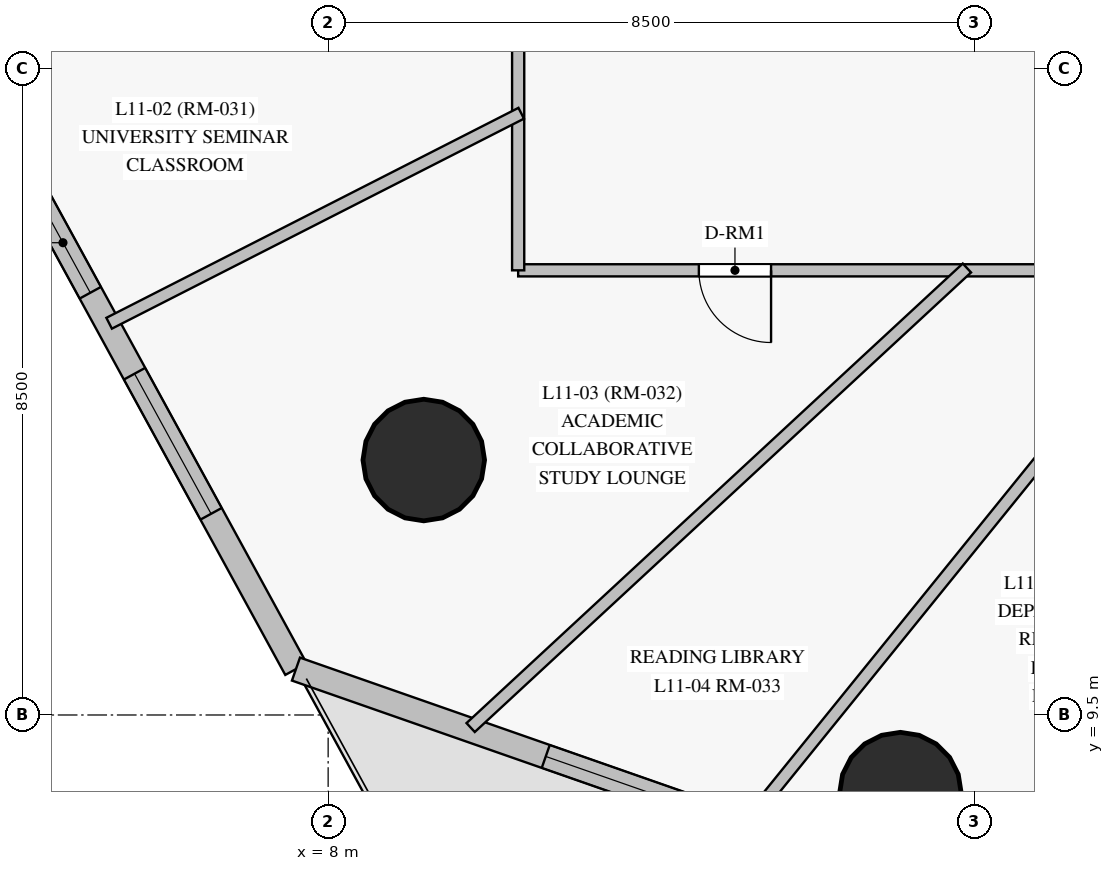
"""IFC4 building model, lengths in metres.
Left out: names, types, materials, properties, quantities, classifications, styles, units other than length and angle.
Written with IfcOpenShell. Run it as: python <this file> out.ifc"""

import sys

from ifc_helpers import new_model, si_unit, direction, frame, frame_2d, origin, origin_with_axes, origin_2d, place, context, subcontext, project, spatial, rectangle, circle, extrude, source, transform, mapped, element, fill, save


model = new_model("IFC4")
c1 = context("Model", 3, precision=1e-05, world=origin(), true_north=direction((0.0, 1.0)))
c2 = subcontext(c1, "Body", "Model", "MODEL_VIEW")
j1 = project(units=[si_unit("LENGTHUNIT", "METRE"), si_unit("PLANEANGLEUNIT", "RADIAN")], contexts=[c1])
p1 = place(None, origin())
s1 = spatial("IfcSite", under=j1, at=p1, CompositionType="ELEMENT")
p2 = place(p1, origin())
s2 = spatial("IfcBuilding", under=s1, at=p2, CompositionType="ELEMENT")
p3 = place(p2, frame((0.0, 0.0, 44.5)))
s3 = spatial("IfcBuildingStorey", under=s2, at=p3, CompositionType="ELEMENT", Elevation=44.5)
m1 = source(origin_with_axes(), c2, "Body", "SweptSolid", [
    extrude(circle(Radius=0.8, at=origin_2d()), origin(), (0.0, 0.0, 1.0), 3.6),
])
for number, where, z_axis, x_axis in (
    (1, (9.258, 12.854, 0.0), (0.0, 0.0, 1.0), (1.0, 0.0, 0.0)),
    (2, (15.529, 8.472, 0.0), (0.0, 0.0, 1.0), (1.0, 0.0, 0.0)),
):
    element("IfcColumn", number, at=place(p3, frame(where, z_axis=z_axis, x_axis=x_axis)), inside=s3, PredefinedType="COLUMN", context=c2, shape_type="MappedRepresentation", body=[
        mapped(m1, transform((0.0, 0.0, 0.0), scale=1.0)),
    ])
p4 = place(p3, frame((3.897, 16.838, 0.0), z_axis=(0.0, 0.0, 1.0), x_axis=(0.479531833204, -0.877524484527, 0.0)))
e3 = element("IfcWall", 3, at=p4, inside=s3, PredefinedType="SOLIDWALL", context=c2, shape_type="SweptSolid", body=[
    extrude(rectangle(XDim=7.674, YDim=0.32, at=frame_2d((3.837, 0.0))), origin(), (0.0, 0.0, 1.0), 3.35),
])
p5 = place(p4, frame((0.532, 0.0, 0.85)))
e4 = element("IfcOpeningElement", 4, at=p5, cuts=e3, PredefinedType="OPENING", context=c2, shape_type="SweptSolid", body=[
    extrude(rectangle(XDim=1.5, YDim=1.85, at=frame_2d((0.75, 0.925))), frame((0.0, 0.17, 0.0), z_axis=(0.0, -1.0, 0.0), x_axis=(1.0, 0.0, 0.0)), (0.0, 0.0, 1.0), 0.34),
])
p6 = place(p4, frame((3.246, 0.0, 0.85)))
e5 = element("IfcOpeningElement", 5, at=p6, cuts=e3, PredefinedType="OPENING", context=c2, shape_type="SweptSolid", body=[
    extrude(rectangle(XDim=2.1, YDim=1.95, at=frame_2d((1.05, 0.975))), frame((0.0, 0.17, 0.0), z_axis=(0.0, -1.0, 0.0), x_axis=(1.0, 0.0, 0.0)), (0.0, 0.0, 1.0), 0.34),
])
p7 = place(p3, frame((7.577, 10.104, 0.0), z_axis=(0.0, 0.0, 1.0), x_axis=(0.943969817427, -0.330031792086, 0.0)))
e6 = element("IfcWall", 6, at=p7, inside=s3, PredefinedType="SOLIDWALL", context=c2, shape_type="SweptSolid", body=[
    extrude(rectangle(XDim=18.568, YDim=0.32, at=frame_2d((9.284, 0.0))), origin(), (0.0, 0.0, 1.0), 3.02),
])
p8 = place(p7, frame((3.481, 0.0, 0.85)))
e7 = element("IfcOpeningElement", 7, at=p8, cuts=e6, PredefinedType="OPENING", context=c2, shape_type="SweptSolid", body=[
    extrude(rectangle(XDim=2.1, YDim=1.95, at=frame_2d((1.05, 0.975))), frame((0.0, 0.17, 0.0), z_axis=(0.0, -1.0, 0.0), x_axis=(1.0, 0.0, 0.0)), (0.0, 0.0, 1.0), 0.34),
])
p9 = place(p7, frame((11.232, 0.0, 0.85)))
e8 = element("IfcOpeningElement", 8, at=p9, cuts=e6, PredefinedType="OPENING", context=c2, shape_type="SweptSolid", body=[
    extrude(rectangle(XDim=2.1, YDim=1.95, at=frame_2d((1.05, 0.975))), frame((0.0, 0.17, 0.0), z_axis=(0.0, -1.0, 0.0), x_axis=(1.0, 0.0, 0.0)), (0.0, 0.0, 1.0), 0.34),
])
p10 = place(p7, frame((14.948, 0.0, 0.0)))
e9 = element("IfcOpeningElement", 9, at=p10, cuts=e6, PredefinedType="OPENING", context=c2, shape_type="SweptSolid", body=[
    extrude(rectangle(XDim=1.05, YDim=2.12, at=frame_2d((0.525, 1.06))), frame((0.0, 0.17, 0.0), z_axis=(0.0, -1.0, 0.0), x_axis=(1.0, 0.0, 0.0)), (0.0, 0.0, 1.0), 0.34),
])
p11 = place(p3, frame((40.25, 15.35, 0.0), z_axis=(0.0, 0.0, 1.0), x_axis=(-1.0, 0.0, 0.0)))
e10 = element("IfcWall", 10, at=p11, inside=s3, PredefinedType="PARTITIONING", context=c2, shape_type="SweptSolid", body=[
    extrude(rectangle(XDim=29.75, YDim=0.16, at=frame_2d((14.875, 0.0))), origin(), (0.0, 0.0, 1.0), 2.7),
])
p12 = place(p11, frame((26.423, 0.0, 0.0)))
e11 = element("IfcOpeningElement", 11, at=p12, cuts=e10, PredefinedType="OPENING", context=c2, shape_type="SweptSolid", body=[
    extrude(rectangle(XDim=0.95, YDim=2.15, at=frame_2d((0.475, 1.075))), frame((0.0, 0.09, 0.0), z_axis=(0.0, -1.0, 0.0), x_axis=(1.0, 0.0, 0.0)), (0.0, 0.0, 1.0), 0.18),
])
p13 = place(p11, frame((21.837, 0.0, 0.0)))
e12 = element("IfcOpeningElement", 12, at=p13, cuts=e10, PredefinedType="OPENING", context=c2, shape_type="SweptSolid", body=[
    extrude(rectangle(XDim=0.95, YDim=2.15, at=frame_2d((0.475, 1.075))), frame((0.0, 0.09, 0.0), z_axis=(0.0, -1.0, 0.0), x_axis=(1.0, 0.0, 0.0)), (0.0, 0.0, 1.0), 0.18),
])
p14 = place(p11, frame((18.863, 0.0, 0.0)))
e13 = element("IfcOpeningElement", 13, at=p14, cuts=e10, PredefinedType="OPENING", context=c2, shape_type="SweptSolid", body=[
    extrude(rectangle(XDim=0.95, YDim=2.15, at=frame_2d((0.475, 1.075))), frame((0.0, 0.09, 0.0), z_axis=(0.0, -1.0, 0.0), x_axis=(1.0, 0.0, 0.0)), (0.0, 0.0, 1.0), 0.18),
])
p15 = place(p11, frame((16.388, 0.0, 0.0)))
e14 = element("IfcOpeningElement", 14, at=p15, cuts=e10, PredefinedType="OPENING", context=c2, shape_type="SweptSolid", body=[
    extrude(rectangle(XDim=0.95, YDim=2.15, at=frame_2d((0.475, 1.075))), frame((0.0, 0.09, 0.0), z_axis=(0.0, -1.0, 0.0), x_axis=(1.0, 0.0, 0.0)), (0.0, 0.0, 1.0), 0.18),
])
p16 = place(p11, frame((14.4, 0.0, 0.0)))
e15 = element("IfcOpeningElement", 15, at=p16, cuts=e10, PredefinedType="OPENING", context=c2, shape_type="SweptSolid", body=[
    extrude(rectangle(XDim=0.95, YDim=2.15, at=frame_2d((0.475, 1.075))), frame((0.0, 0.09, 0.0), z_axis=(0.0, -1.0, 0.0), x_axis=(1.0, 0.0, 0.0)), (0.0, 0.0, 1.0), 0.18),
])
p17 = place(p11, frame((12.118, 0.0, 0.0)))
e16 = element("IfcOpeningElement", 16, at=p17, cuts=e10, PredefinedType="OPENING", context=c2, shape_type="SweptSolid", body=[
    extrude(rectangle(XDim=0.95, YDim=2.15, at=frame_2d((0.475, 1.075))), frame((0.0, 0.09, 0.0), z_axis=(0.0, -1.0, 0.0), x_axis=(1.0, 0.0, 0.0)), (0.0, 0.0, 1.0), 0.18),
])
p18 = place(p11, frame((9.938, 0.0, 0.0)))
e17 = element("IfcOpeningElement", 17, at=p18, cuts=e10, PredefinedType="OPENING", context=c2, shape_type="SweptSolid", body=[
    extrude(rectangle(XDim=0.95, YDim=2.15, at=frame_2d((0.475, 1.075))), frame((0.0, 0.09, 0.0), z_axis=(0.0, -1.0, 0.0), x_axis=(1.0, 0.0, 0.0)), (0.0, 0.0, 1.0), 0.18),
])
p19 = place(p11, frame((6.962, 0.0, 0.0)))
e18 = element("IfcOpeningElement", 18, at=p19, cuts=e10, PredefinedType="OPENING", context=c2, shape_type="SweptSolid", body=[
    extrude(rectangle(XDim=0.95, YDim=2.15, at=frame_2d((0.475, 1.075))), frame((0.0, 0.09, 0.0), z_axis=(0.0, -1.0, 0.0), x_axis=(1.0, 0.0, 0.0)), (0.0, 0.0, 1.0), 0.18),
])
p20 = place(p3, frame((10.5, 15.35, 0.0), z_axis=(0.0, 0.0, 1.0), x_axis=(0.0, 1.0, 0.0)))
e19 = element("IfcWall", 19, at=p20, inside=s3, PredefinedType="PARTITIONING", context=c2, shape_type="SweptSolid", body=[
    extrude(rectangle(XDim=22.3, YDim=0.16, at=frame_2d((11.15, 0.0))), origin(), (0.0, 0.0, 1.0), 2.75),
])
p21 = place(p20, frame((10.035, 0.0, 0.0)))
e20 = element("IfcOpeningElement", 20, at=p21, cuts=e19, PredefinedType="OPENING", context=c2, shape_type="SweptSolid", body=[
    extrude(rectangle(XDim=0.95, YDim=2.15, at=frame_2d((0.475, 1.075))), frame((0.0, 0.09, 0.0), z_axis=(0.0, -1.0, 0.0), x_axis=(1.0, 0.0, 0.0)), (0.0, 0.0, 1.0), 0.18),
])
p22 = place(p20, frame((3.031, 0.0, 0.0)))
e21 = element("IfcOpeningElement", 21, at=p22, cuts=e19, PredefinedType="OPENING", context=c2, shape_type="SweptSolid", body=[
    extrude(rectangle(XDim=0.96, YDim=2.15, at=frame_2d((0.48, 1.075))), frame((0.0, 0.09, 0.0), z_axis=(0.0, -1.0, 0.0), x_axis=(1.0, 0.0, 0.0)), (0.0, 0.0, 1.0), 0.18),
])
p23 = place(p20, frame((16.25, 0.0, 0.0)))
e22 = element("IfcOpeningElement", 22, at=p23, cuts=e19, PredefinedType="OPENING", context=c2, shape_type="SweptSolid", body=[
    extrude(rectangle(XDim=0.95, YDim=2.15, at=frame_2d((0.475, 1.075))), frame((0.0, 0.09, 0.0), z_axis=(0.0, -1.0, 0.0), x_axis=(1.0, 0.0, 0.0)), (0.0, 0.0, 1.0), 0.18),
])
p24 = place(p20, frame((12.443, 0.0, 0.0)))
e23 = element("IfcOpeningElement", 23, at=p24, cuts=e19, PredefinedType="OPENING", context=c2, shape_type="SweptSolid", body=[
    extrude(rectangle(XDim=0.95, YDim=2.15, at=frame_2d((0.475, 1.075))), frame((0.0, 0.09, 0.0), z_axis=(0.0, -1.0, 0.0), x_axis=(1.0, 0.0, 0.0)), (0.0, 0.0, 1.0), 0.18),
])
p25 = place(p3, frame((19.423, 15.385, 0.0), z_axis=(0.0, 0.0, 1.0), x_axis=(-0.629280245268, -0.777178469153, 0.0)))
e24 = element("IfcWall", 24, at=p25, inside=s3, PredefinedType="PARTITIONING", context=c2, shape_type="SweptSolid", body=[
    extrude(rectangle(XDim=9.419, YDim=0.16, at=frame_2d((4.709, 0.0))), origin(), (0.0, 0.0, 1.0), 2.7),
])
p26 = place(p3, frame((16.404, 15.381, 0.0), z_axis=(0.0, 0.0, 1.0), x_axis=(-0.733733824599, -0.679437027722, 0.0)))
e25 = element("IfcWall", 25, at=p26, inside=s3, PredefinedType="PARTITIONING", context=c2, shape_type="SweptSolid", body=[
    extrude(rectangle(XDim=8.898, YDim=0.16, at=frame_2d((4.449, 0.0))), origin(), (0.0, 0.0, 1.0), 3.35),
])
p27 = place(p3, frame((10.54, 17.416, 0.0), z_axis=(0.0, 0.0, 1.0), x_axis=(-0.890998767968, -0.454005721857, 0.0)))
e26 = element("IfcWall", 26, at=p27, inside=s3, PredefinedType="PARTITIONING", context=c2, shape_type="SweptSolid", body=[
    extrude(rectangle(XDim=6.085, YDim=0.16, at=frame_2d((3.042, 0.0))), origin(), (0.0, 0.0, 1.0), 3.35),
])
m2 = source(origin_with_axes(), c2, "Body", "SweptSolid", [
    extrude(rectangle(XDim=1.5, YDim=1.85, at=frame_2d((0.75, 0.925))), frame((0.0, 0.03, 0.0), z_axis=(0.0, -1.0, 0.0), x_axis=(1.0, 0.0, 0.0)), (0.0, 0.0, 1.0), 0.06),
])
p28 = place(p5, origin())
e27 = element("IfcWindow", 27, at=p28, inside=s3, PartitioningType="SINGLE_PANEL", PredefinedType="WINDOW", context=c2, shape_type="MappedRepresentation", body=[
    mapped(m2, transform((0.0, 0.0, 0.0), scale=1.0)),
])
fill(e4, e27)
m3 = source(origin_with_axes(), c2, "Body", "SweptSolid", [
    extrude(rectangle(XDim=2.1, YDim=1.95, at=frame_2d((1.05, 0.975))), frame((0.0, 0.03, 0.0), z_axis=(0.0, -1.0, 0.0), x_axis=(1.0, 0.0, 0.0)), (0.0, 0.0, 1.0), 0.06),
])
p29 = place(p6, origin())
e28 = element("IfcWindow", 28, at=p29, inside=s3, PartitioningType="SINGLE_PANEL", PredefinedType="WINDOW", context=c2, shape_type="MappedRepresentation", body=[
    mapped(m3, transform((0.0, 0.0, 0.0), scale=1.0)),
])
fill(e5, e28)
p30 = place(p8, origin())
e29 = element("IfcWindow", 29, at=p30, inside=s3, PartitioningType="SINGLE_PANEL", PredefinedType="WINDOW", context=c2, shape_type="MappedRepresentation", body=[
    mapped(m3, transform((0.0, 0.0, 0.0), scale=1.0)),
])
fill(e7, e29)
m4 = source(origin_with_axes(), c2, "Body", "SweptSolid", [
    extrude(rectangle(XDim=0.95, YDim=2.15, at=frame_2d((0.475, 1.075))), frame((0.0, 0.025, 0.0), z_axis=(0.0, -1.0, 0.0), x_axis=(1.0, 0.0, 0.0)), (0.0, 0.0, 1.0), 0.05),
])
p31 = place(p12, origin())
e30 = element("IfcDoor", 30, at=p31, inside=s3, OperationType="SINGLE_SWING_LEFT", PredefinedType="DOOR", context=c2, shape_type="MappedRepresentation", body=[
    mapped(m4, transform((0.0, 0.0, 0.0), scale=1.0)),
])
fill(e11, e30)
save(model, sys.argv[1])
